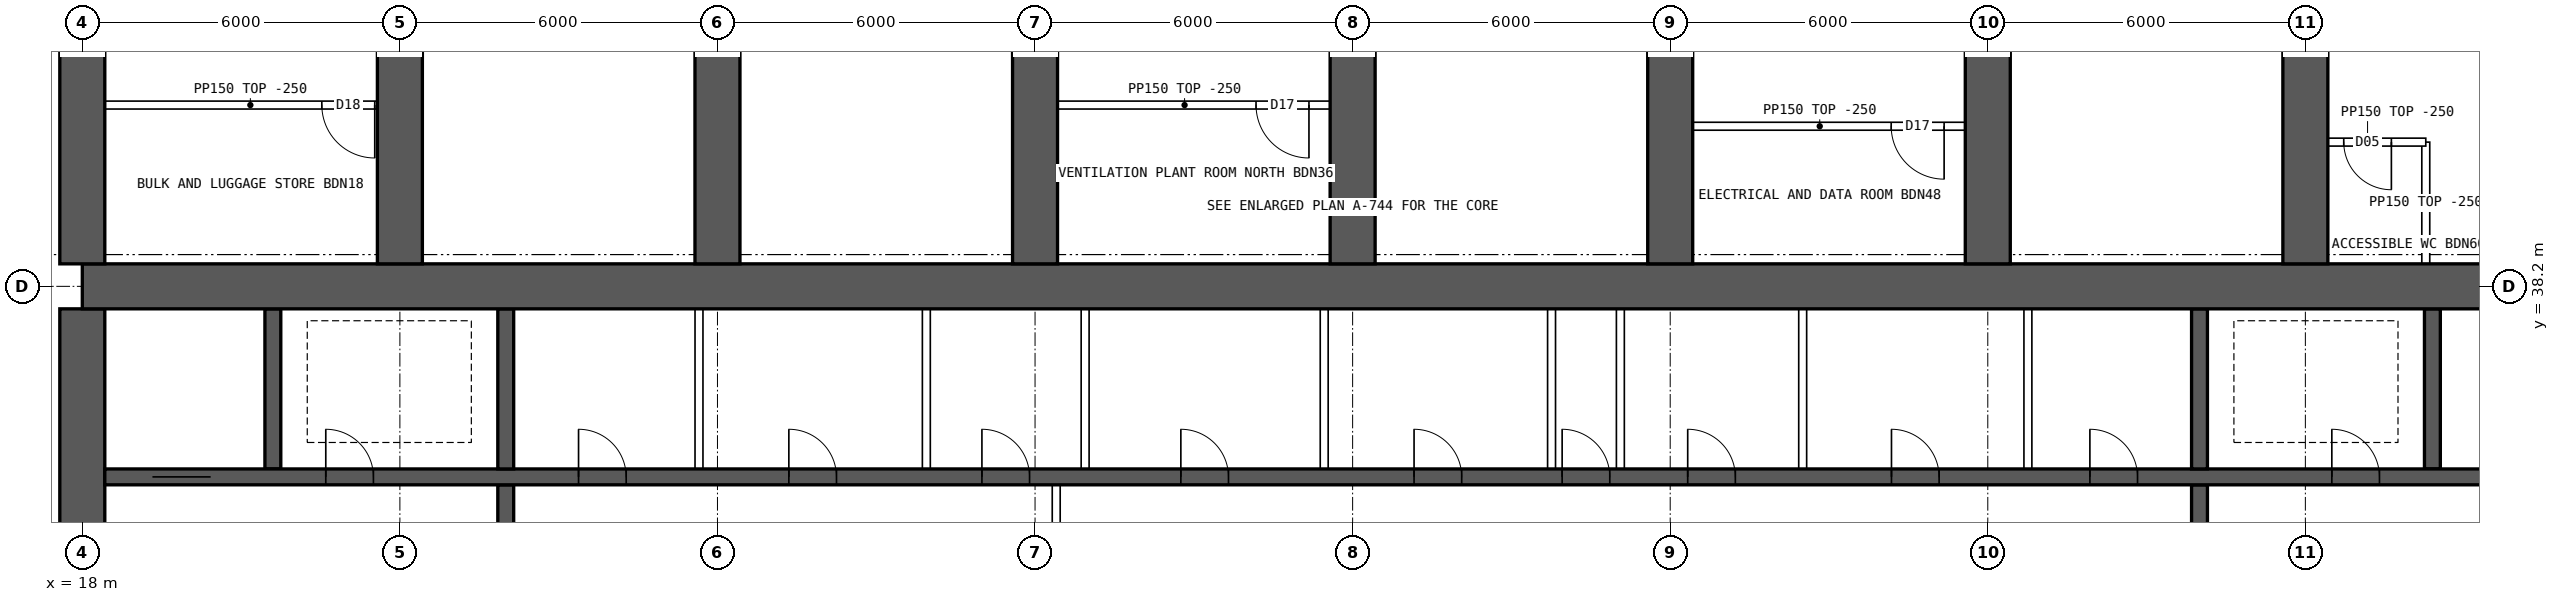
"""IFC4 building model, lengths in metres.
Left out: names, types, materials, properties, quantities, classifications, styles, units other than length and angle.
Written with IfcOpenShell. Run it as: python <this file> out.ifc"""

import sys

from ifc_helpers import new_model, si_unit, direction, frame, frame_2d, origin, place, context, subcontext, project, spatial, rectangle, extrude, element, fill, save


model = new_model("IFC4")
c1 = context("Model", 3, precision=1e-05, world=origin(), true_north=direction((0.0, 1.0)))
c2 = subcontext(c1, "Body", "Model", "MODEL_VIEW")
j1 = project(units=[si_unit("LENGTHUNIT", "METRE"), si_unit("PLANEANGLEUNIT", "RADIAN")], contexts=[c1])
p1 = place(None, origin())
s1 = spatial("IfcSite", under=j1, at=p1, CompositionType="ELEMENT")
p2 = place(p1, origin())
s2 = spatial("IfcBuilding", under=s1, at=p2, CompositionType="ELEMENT")
p3 = place(p2, frame((0.0, 0.0, 167.35)))
s3 = spatial("IfcBuildingStorey", under=s2, at=p3, CompositionType="ELEMENT", Elevation=167.35)
p4 = place(p3, frame((18.0, 38.2, 0.0), z_axis=(0.0, 0.0, 1.0), x_axis=(1.0, 0.0, 0.0)))
e1 = element("IfcWall", 1, at=p4, inside=s3, PredefinedType="SHEAR", context=c2, shape_type="SweptSolid", body=[
    extrude(rectangle(XDim=48.0, YDim=0.85, at=frame_2d((24.0, 0.0))), origin(), (0.0, 0.0, 1.0), 3.75),
])
p5 = place(p3, frame((18.0, 26.225, 0.0), z_axis=(0.0, 0.0, 1.0), x_axis=(0.0, 1.0, 0.0)))
e2 = element("IfcWall", 2, at=p5, inside=s3, PredefinedType="SHEAR", context=c2, shape_type="SweptSolid", body=[
    extrude(rectangle(XDim=11.55, YDim=0.85, at=frame_2d((5.775, 0.0))), origin(), (0.0, 0.0, 1.0), 3.75),
])
p6 = place(p5, frame((5.075, 0.0, 0.0)))
e3 = element("IfcOpeningElement", 3, at=p6, cuts=e2, PredefinedType="OPENING", context=c2, shape_type="SweptSolid", body=[
    extrude(rectangle(XDim=1.2, YDim=2.1, at=frame_2d((0.6, 1.05))), frame((0.0, 0.435, 0.0), z_axis=(0.0, -1.0, 0.0), x_axis=(1.0, 0.0, 0.0)), (0.0, 0.0, 1.0), 0.87),
])
p7 = place(p3, frame((18.425, 34.6, 0.0), z_axis=(0.0, 0.0, 1.0), x_axis=(1.0, 0.0, 0.0)))
e4 = element("IfcWall", 4, at=p7, inside=s3, PredefinedType="SHEAR", context=c2, shape_type="SweptSolid", body=[
    extrude(rectangle(XDim=47.15, YDim=0.3, at=frame_2d((23.575, 0.0))), origin(), (0.0, 0.0, 1.0), 3.75),
])
p8 = place(p7, frame((0.9, 0.0, 0.0)))
e5 = element("IfcOpeningElement", 5, at=p8, cuts=e4, PredefinedType="OPENING", context=c2, shape_type="SweptSolid", body=[
    extrude(rectangle(XDim=1.1, YDim=2.1, at=frame_2d((0.55, 1.05))), frame((0.0, 0.16, 0.0), z_axis=(0.0, -1.0, 0.0), x_axis=(1.0, 0.0, 0.0)), (0.0, 0.0, 1.0), 0.32),
])
p9 = place(p7, frame((45.15, 0.0, 0.0)))
e6 = element("IfcOpeningElement", 6, at=p9, cuts=e4, PredefinedType="OPENING", context=c2, shape_type="SweptSolid", body=[
    extrude(rectangle(XDim=1.1, YDim=2.1, at=frame_2d((0.55, 1.05))), frame((0.0, 0.16, 0.0), z_axis=(0.0, -1.0, 0.0), x_axis=(1.0, 0.0, 0.0)), (0.0, 0.0, 1.0), 0.32),
])
p10 = place(p7, frame((4.175, 0.0, 0.0)))
e7 = element("IfcOpeningElement", 7, at=p10, cuts=e4, PredefinedType="OPENING", context=c2, shape_type="SweptSolid", body=[
    extrude(rectangle(XDim=0.9, YDim=2.1, at=frame_2d((0.45, 1.05))), frame((0.0, 0.16, 0.0), z_axis=(0.0, -1.0, 0.0), x_axis=(1.0, 0.0, 0.0)), (0.0, 0.0, 1.0), 0.32),
])
p11 = place(p7, frame((42.075, 0.0, 0.0)))
e8 = element("IfcOpeningElement", 8, at=p11, cuts=e4, PredefinedType="OPENING", context=c2, shape_type="SweptSolid", body=[
    extrude(rectangle(XDim=0.9, YDim=2.1, at=frame_2d((0.45, 1.05))), frame((0.0, 0.16, 0.0), z_axis=(0.0, -1.0, 0.0), x_axis=(1.0, 0.0, 0.0)), (0.0, 0.0, 1.0), 0.32),
])
p12 = place(p7, frame((8.95, 0.0, 0.0)))
e9 = element("IfcOpeningElement", 9, at=p12, cuts=e4, PredefinedType="OPENING", context=c2, shape_type="SweptSolid", body=[
    extrude(rectangle(XDim=0.9, YDim=2.1, at=frame_2d((0.45, 1.05))), frame((0.0, 0.16, 0.0), z_axis=(0.0, -1.0, 0.0), x_axis=(1.0, 0.0, 0.0)), (0.0, 0.0, 1.0), 0.32),
])
p13 = place(p7, frame((12.924, 0.0, 0.0)))
e10 = element("IfcOpeningElement", 10, at=p13, cuts=e4, PredefinedType="OPENING", context=c2, shape_type="SweptSolid", body=[
    extrude(rectangle(XDim=0.9, YDim=2.1, at=frame_2d((0.45, 1.05))), frame((0.0, 0.16, 0.0), z_axis=(0.0, -1.0, 0.0), x_axis=(1.0, 0.0, 0.0)), (0.0, 0.0, 1.0), 0.32),
])
p14 = place(p7, frame((16.571, 0.0, 0.0)))
e11 = element("IfcOpeningElement", 11, at=p14, cuts=e4, PredefinedType="OPENING", context=c2, shape_type="SweptSolid", body=[
    extrude(rectangle(XDim=0.9, YDim=2.1, at=frame_2d((0.45, 1.05))), frame((0.0, 0.16, 0.0), z_axis=(0.0, -1.0, 0.0), x_axis=(1.0, 0.0, 0.0)), (0.0, 0.0, 1.0), 0.32),
])
p15 = place(p7, frame((20.33, 0.0, 0.0)))
e12 = element("IfcOpeningElement", 12, at=p15, cuts=e4, PredefinedType="OPENING", context=c2, shape_type="SweptSolid", body=[
    extrude(rectangle(XDim=0.9, YDim=2.1, at=frame_2d((0.45, 1.05))), frame((0.0, 0.16, 0.0), z_axis=(0.0, -1.0, 0.0), x_axis=(1.0, 0.0, 0.0)), (0.0, 0.0, 1.0), 0.32),
])
p16 = place(p7, frame((24.736, 0.0, 0.0)))
e13 = element("IfcOpeningElement", 13, at=p16, cuts=e4, PredefinedType="OPENING", context=c2, shape_type="SweptSolid", body=[
    extrude(rectangle(XDim=0.9, YDim=2.1, at=frame_2d((0.45, 1.05))), frame((0.0, 0.16, 0.0), z_axis=(0.0, -1.0, 0.0), x_axis=(1.0, 0.0, 0.0)), (0.0, 0.0, 1.0), 0.32),
])
p17 = place(p7, frame((27.533, 0.0, 0.0)))
e14 = element("IfcOpeningElement", 14, at=p17, cuts=e4, PredefinedType="OPENING", context=c2, shape_type="SweptSolid", body=[
    extrude(rectangle(XDim=0.9, YDim=2.1, at=frame_2d((0.45, 1.05))), frame((0.0, 0.16, 0.0), z_axis=(0.0, -1.0, 0.0), x_axis=(1.0, 0.0, 0.0)), (0.0, 0.0, 1.0), 0.32),
])
p18 = place(p7, frame((29.906, 0.0, 0.0)))
e15 = element("IfcOpeningElement", 15, at=p18, cuts=e4, PredefinedType="OPENING", context=c2, shape_type="SweptSolid", body=[
    extrude(rectangle(XDim=0.9, YDim=2.1, at=frame_2d((0.45, 1.05))), frame((0.0, 0.16, 0.0), z_axis=(0.0, -1.0, 0.0), x_axis=(1.0, 0.0, 0.0)), (0.0, 0.0, 1.0), 0.32),
])
p19 = place(p7, frame((33.756, 0.0, 0.0)))
e16 = element("IfcOpeningElement", 16, at=p19, cuts=e4, PredefinedType="OPENING", context=c2, shape_type="SweptSolid", body=[
    extrude(rectangle(XDim=0.9, YDim=2.1, at=frame_2d((0.45, 1.05))), frame((0.0, 0.16, 0.0), z_axis=(0.0, -1.0, 0.0), x_axis=(1.0, 0.0, 0.0)), (0.0, 0.0, 1.0), 0.32),
])
p20 = place(p7, frame((37.504, 0.0, 0.0)))
e17 = element("IfcOpeningElement", 17, at=p20, cuts=e4, PredefinedType="OPENING", context=c2, shape_type="SweptSolid", body=[
    extrude(rectangle(XDim=0.9, YDim=2.1, at=frame_2d((0.45, 1.05))), frame((0.0, 0.16, 0.0), z_axis=(0.0, -1.0, 0.0), x_axis=(1.0, 0.0, 0.0)), (0.0, 0.0, 1.0), 0.32),
])
p21 = place(p3, frame((26.0, 30.55, 0.0), z_axis=(0.0, 0.0, 1.0), x_axis=(0.0, 1.0, 0.0)))
e18 = element("IfcWall", 18, at=p21, inside=s3, PredefinedType="SHEAR", context=c2, shape_type="SweptSolid", body=[
    extrude(rectangle(XDim=3.9, YDim=0.3, at=frame_2d((1.95, 0.0))), origin(), (0.0, 0.0, 1.0), 3.75),
])
p22 = place(p21, frame((1.4, 0.0, 0.0)))
e19 = element("IfcOpeningElement", 19, at=p22, cuts=e18, PredefinedType="OPENING", context=c2, shape_type="SweptSolid", body=[
    extrude(rectangle(XDim=1.2, YDim=2.1, at=frame_2d((0.6, 1.05))), frame((0.0, 0.16, 0.0), z_axis=(0.0, -1.0, 0.0), x_axis=(1.0, 0.0, 0.0)), (0.0, 0.0, 1.0), 0.32),
])
p23 = place(p3, frame((58.0, 30.55, 0.0), z_axis=(0.0, 0.0, 1.0), x_axis=(0.0, 1.0, 0.0)))
e20 = element("IfcWall", 20, at=p23, inside=s3, PredefinedType="SHEAR", context=c2, shape_type="SweptSolid", body=[
    extrude(rectangle(XDim=3.9, YDim=0.3, at=frame_2d((1.95, 0.0))), origin(), (0.0, 0.0, 1.0), 3.75),
])
p24 = place(p23, frame((1.4, 0.0, 0.0)))
e21 = element("IfcOpeningElement", 21, at=p24, cuts=e20, PredefinedType="OPENING", context=c2, shape_type="SweptSolid", body=[
    extrude(rectangle(XDim=1.2, YDim=2.1, at=frame_2d((0.6, 1.05))), frame((0.0, 0.16, 0.0), z_axis=(0.0, -1.0, 0.0), x_axis=(1.0, 0.0, 0.0)), (0.0, 0.0, 1.0), 0.32),
])
for number, where, z_axis, x_axis in (
    (22, (21.6, 34.75, 0.0), (0.0, 0.0, 1.0), (0.0, 1.0, 0.0)),
    (23, (62.4, 34.75, 0.0), (0.0, 0.0, 1.0), (0.0, 1.0, 0.0)),
    (24, (26.0, 34.75, 0.0), (0.0, 0.0, 1.0), (0.0, 1.0, 0.0)),
    (25, (58.0, 34.75, 0.0), (0.0, 0.0, 1.0), (0.0, 1.0, 0.0)),
):
    element("IfcWall", number, at=place(p3, frame(where, z_axis=z_axis, x_axis=x_axis)), inside=s3, PredefinedType="SHEAR", context=c2, shape_type="SweptSolid", body=[
        extrude(rectangle(XDim=3.025, YDim=0.3, at=frame_2d((1.512, 0.0))), origin(), (0.0, 0.0, 1.0), 3.75),
    ])
for number, where, z_axis, x_axis in (
    (26, (18.0, 38.625, 0.0), (0.0, 0.0, 1.0), (0.0, 1.0, 0.0)),
    (27, (24.0, 38.625, 0.0), (0.0, 0.0, 1.0), (0.0, 1.0, 0.0)),
    (28, (30.0, 38.625, 0.0), (0.0, 0.0, 1.0), (0.0, 1.0, 0.0)),
    (29, (36.0, 38.625, 0.0), (0.0, 0.0, 1.0), (0.0, 1.0, 0.0)),
    (30, (42.0, 38.625, 0.0), (0.0, 0.0, 1.0), (0.0, 1.0, 0.0)),
    (31, (48.0, 38.625, 0.0), (0.0, 0.0, 1.0), (0.0, 1.0, 0.0)),
    (32, (54.0, 38.625, 0.0), (0.0, 0.0, 1.0), (0.0, 1.0, 0.0)),
    (33, (60.0, 38.625, 0.0), (0.0, 0.0, 1.0), (0.0, 1.0, 0.0)),
):
    element("IfcWall", number, at=place(p3, frame(where, z_axis=z_axis, x_axis=x_axis)), inside=s3, PredefinedType="SHEAR", context=c2, shape_type="SweptSolid", body=[
        extrude(rectangle(XDim=8.175, YDim=0.85, at=frame_2d((4.087, 0.0))), origin(), (0.0, 0.0, 1.0), 3.75),
    ])
p25 = place(p3, frame((36.4, 30.55, 0.0), z_axis=(0.0, 0.0, 1.0), x_axis=(0.0, 1.0, 0.0)))
e34 = element("IfcWall", 34, at=p25, inside=s3, PredefinedType="SOLIDWALL", context=c2, shape_type="SweptSolid", body=[
    extrude(rectangle(XDim=3.9, YDim=0.15, at=frame_2d((1.95, 0.0))), origin(), (0.0, 0.0, 1.0), 3.5),
])
p26 = place(p25, frame((1.15, 0.0, 0.0)))
e35 = element("IfcOpeningElement", 35, at=p26, cuts=e34, PredefinedType="OPENING", context=c2, shape_type="SweptSolid", body=[
    extrude(rectangle(XDim=1.6, YDim=2.1, at=frame_2d((0.8, 1.05))), frame((0.0, 0.085, 0.0), z_axis=(0.0, -1.0, 0.0), x_axis=(1.0, 0.0, 0.0)), (0.0, 0.0, 1.0), 0.17),
])
for number, where, z_axis, x_axis in (
    (36, (29.651, 34.75, 0.0), (0.0, 0.0, 1.0), (0.0, 1.0, 0.0)),
    (37, (33.946, 34.75, 0.0), (0.0, 0.0, 1.0), (0.0, 1.0, 0.0)),
    (38, (36.946, 34.75, 0.0), (0.0, 0.0, 1.0), (0.0, 1.0, 0.0)),
    (39, (41.463, 34.75, 0.0), (0.0, 0.0, 1.0), (0.0, 1.0, 0.0)),
    (40, (45.758, 34.75, 0.0), (0.0, 0.0, 1.0), (0.0, 1.0, 0.0)),
    (41, (47.058, 34.75, 0.0), (0.0, 0.0, 1.0), (0.0, 1.0, 0.0)),
    (42, (50.503, 34.75, 0.0), (0.0, 0.0, 1.0), (0.0, 1.0, 0.0)),
    (43, (54.758, 34.75, 0.0), (0.0, 0.0, 1.0), (0.0, 1.0, 0.0)),
):
    element("IfcWall", number, at=place(p3, frame(where, z_axis=z_axis, x_axis=x_axis)), inside=s3, PredefinedType="SOLIDWALL", context=c2, shape_type="SweptSolid", body=[
        extrude(rectangle(XDim=3.025, YDim=0.15, at=frame_2d((1.512, 0.0))), origin(), (0.0, 0.0, 1.0), 3.5),
    ])
p27 = place(p3, frame((23.925, 41.625, 0.0), z_axis=(0.0, 0.0, 1.0), x_axis=(-1.0, 0.0, 0.0)))
e44 = element("IfcWall", 44, at=p27, inside=s3, PredefinedType="PARTITIONING", context=c2, shape_type="SweptSolid", body=[
    extrude(rectangle(XDim=5.5, YDim=0.15, at=frame_2d((2.75, 0.0))), origin(), (0.0, 0.0, 1.0), 3.5),
])
p28 = place(p27, frame((0.4, 0.0, 0.0)))
e45 = element("IfcOpeningElement", 45, at=p28, cuts=e44, PredefinedType="OPENING", context=c2, shape_type="SweptSolid", body=[
    extrude(rectangle(XDim=1.0, YDim=2.1, at=frame_2d((0.5, 1.05))), frame((0.0, 0.085, 0.0), z_axis=(0.0, -1.0, 0.0), x_axis=(1.0, 0.0, 0.0)), (0.0, 0.0, 1.0), 0.17),
])
p29 = place(p3, frame((41.575, 41.625, 0.0), z_axis=(0.0, 0.0, 1.0), x_axis=(-1.0, 0.0, 0.0)))
e46 = element("IfcWall", 46, at=p29, inside=s3, PredefinedType="PARTITIONING", context=c2, shape_type="SweptSolid", body=[
    extrude(rectangle(XDim=5.5, YDim=0.15, at=frame_2d((2.75, 0.0))), origin(), (0.0, 0.0, 1.0), 3.5),
])
p30 = place(p29, frame((0.4, 0.0, 0.0)))
e47 = element("IfcOpeningElement", 47, at=p30, cuts=e46, PredefinedType="OPENING", context=c2, shape_type="SweptSolid", body=[
    extrude(rectangle(XDim=1.0, YDim=2.1, at=frame_2d((0.5, 1.05))), frame((0.0, 0.085, 0.0), z_axis=(0.0, -1.0, 0.0), x_axis=(1.0, 0.0, 0.0)), (0.0, 0.0, 1.0), 0.17),
])
p31 = place(p3, frame((53.575, 41.225, 0.0), z_axis=(0.0, 0.0, 1.0), x_axis=(-1.0, 0.0, 0.0)))
e48 = element("IfcWall", 48, at=p31, inside=s3, PredefinedType="PARTITIONING", context=c2, shape_type="SweptSolid", body=[
    extrude(rectangle(XDim=5.5, YDim=0.15, at=frame_2d((2.75, 0.0))), origin(), (0.0, 0.0, 1.0), 3.5),
])
p32 = place(p31, frame((0.4, 0.0, 0.0)))
e49 = element("IfcOpeningElement", 49, at=p32, cuts=e48, PredefinedType="OPENING", context=c2, shape_type="SweptSolid", body=[
    extrude(rectangle(XDim=1.0, YDim=2.1, at=frame_2d((0.5, 1.05))), frame((0.0, 0.085, 0.0), z_axis=(0.0, -1.0, 0.0), x_axis=(1.0, 0.0, 0.0)), (0.0, 0.0, 1.0), 0.17),
])
p33 = place(p3, frame((62.275, 40.925, 0.0), z_axis=(0.0, 0.0, 1.0), x_axis=(0.0, -1.0, 0.0)))
e50 = element("IfcWall", 50, at=p33, inside=s3, PredefinedType="PARTITIONING", context=c2, shape_type="SweptSolid", body=[
    extrude(rectangle(XDim=2.3, YDim=0.15, at=frame_2d((1.15, 0.0))), origin(), (0.0, 0.0, 1.0), 3.5),
])
p34 = place(p3, frame((62.275, 40.925, 0.0), z_axis=(0.0, 0.0, 1.0), x_axis=(-1.0, 0.0, 0.0)))
e51 = element("IfcWall", 51, at=p34, inside=s3, PredefinedType="PARTITIONING", context=c2, shape_type="SweptSolid", body=[
    extrude(rectangle(XDim=2.2, YDim=0.15, at=frame_2d((1.1, 0.0))), origin(), (0.0, 0.0, 1.0), 3.5),
])
p35 = place(p34, frame((0.65, 0.0, 0.0)))
e52 = element("IfcOpeningElement", 52, at=p35, cuts=e51, PredefinedType="OPENING", context=c2, shape_type="SweptSolid", body=[
    extrude(rectangle(XDim=0.9, YDim=2.1, at=frame_2d((0.45, 1.05))), frame((0.0, 0.085, 0.0), z_axis=(0.0, -1.0, 0.0), x_axis=(1.0, 0.0, 0.0)), (0.0, 0.0, 1.0), 0.17),
])
p36 = place(p8, origin())
e53 = element("IfcDoor", 53, at=p36, inside=s3, OperationType="DOUBLE_DOOR_SLIDING", PredefinedType="DOOR", context=c2, shape_type="SweptSolid", body=[
    extrude(rectangle(XDim=1.1, YDim=2.1, at=frame_2d((0.55, 1.05))), frame((0.0, 0.025, 0.0), z_axis=(0.0, -1.0, 0.0), x_axis=(1.0, 0.0, 0.0)), (0.0, 0.0, 1.0), 0.05),
])
fill(e5, e53)
p37 = place(p10, origin())
e54 = element("IfcDoor", 54, at=p37, inside=s3, OperationType="SINGLE_SWING_LEFT", PredefinedType="DOOR", context=c2, shape_type="SweptSolid", body=[
    extrude(rectangle(XDim=0.9, YDim=2.1, at=frame_2d((0.45, 1.05))), frame((0.0, 0.025, 0.0), z_axis=(0.0, -1.0, 0.0), x_axis=(1.0, 0.0, 0.0)), (0.0, 0.0, 1.0), 0.05),
])
fill(e7, e54)
p38 = place(p11, origin())
e55 = element("IfcDoor", 55, at=p38, inside=s3, OperationType="SINGLE_SWING_LEFT", PredefinedType="DOOR", context=c2, shape_type="SweptSolid", body=[
    extrude(rectangle(XDim=0.9, YDim=2.1, at=frame_2d((0.45, 1.05))), frame((0.0, 0.025, 0.0), z_axis=(0.0, -1.0, 0.0), x_axis=(1.0, 0.0, 0.0)), (0.0, 0.0, 1.0), 0.05),
])
fill(e8, e55)
p39 = place(p12, origin())
e56 = element("IfcDoor", 56, at=p39, inside=s3, OperationType="SINGLE_SWING_LEFT", PredefinedType="DOOR", context=c2, shape_type="SweptSolid", body=[
    extrude(rectangle(XDim=0.9, YDim=2.1, at=frame_2d((0.45, 1.05))), frame((0.0, 0.025, 0.0), z_axis=(0.0, -1.0, 0.0), x_axis=(1.0, 0.0, 0.0)), (0.0, 0.0, 1.0), 0.05),
])
fill(e9, e56)
p40 = place(p13, origin())
e57 = element("IfcDoor", 57, at=p40, inside=s3, OperationType="SINGLE_SWING_LEFT", PredefinedType="DOOR", context=c2, shape_type="SweptSolid", body=[
    extrude(rectangle(XDim=0.9, YDim=2.1, at=frame_2d((0.45, 1.05))), frame((0.0, 0.025, 0.0), z_axis=(0.0, -1.0, 0.0), x_axis=(1.0, 0.0, 0.0)), (0.0, 0.0, 1.0), 0.05),
])
fill(e10, e57)
p41 = place(p14, origin())
e58 = element("IfcDoor", 58, at=p41, inside=s3, OperationType="SINGLE_SWING_LEFT", PredefinedType="DOOR", context=c2, shape_type="SweptSolid", body=[
    extrude(rectangle(XDim=0.9, YDim=2.1, at=frame_2d((0.45, 1.05))), frame((0.0, 0.025, 0.0), z_axis=(0.0, -1.0, 0.0), x_axis=(1.0, 0.0, 0.0)), (0.0, 0.0, 1.0), 0.05),
])
fill(e11, e58)
p42 = place(p15, origin())
e59 = element("IfcDoor", 59, at=p42, inside=s3, OperationType="SINGLE_SWING_LEFT", PredefinedType="DOOR", context=c2, shape_type="SweptSolid", body=[
    extrude(rectangle(XDim=0.9, YDim=2.1, at=frame_2d((0.45, 1.05))), frame((0.0, 0.025, 0.0), z_axis=(0.0, -1.0, 0.0), x_axis=(1.0, 0.0, 0.0)), (0.0, 0.0, 1.0), 0.05),
])
fill(e12, e59)
p43 = place(p16, origin())
e60 = element("IfcDoor", 60, at=p43, inside=s3, OperationType="SINGLE_SWING_LEFT", PredefinedType="DOOR", context=c2, shape_type="SweptSolid", body=[
    extrude(rectangle(XDim=0.9, YDim=2.1, at=frame_2d((0.45, 1.05))), frame((0.0, 0.025, 0.0), z_axis=(0.0, -1.0, 0.0), x_axis=(1.0, 0.0, 0.0)), (0.0, 0.0, 1.0), 0.05),
])
fill(e13, e60)
p44 = place(p17, origin())
e61 = element("IfcDoor", 61, at=p44, inside=s3, OperationType="SINGLE_SWING_LEFT", PredefinedType="DOOR", context=c2, shape_type="SweptSolid", body=[
    extrude(rectangle(XDim=0.9, YDim=2.1, at=frame_2d((0.45, 1.05))), frame((0.0, 0.025, 0.0), z_axis=(0.0, -1.0, 0.0), x_axis=(1.0, 0.0, 0.0)), (0.0, 0.0, 1.0), 0.05),
])
fill(e14, e61)
p45 = place(p18, origin())
e62 = element("IfcDoor", 62, at=p45, inside=s3, OperationType="SINGLE_SWING_LEFT", PredefinedType="DOOR", context=c2, shape_type="SweptSolid", body=[
    extrude(rectangle(XDim=0.9, YDim=2.1, at=frame_2d((0.45, 1.05))), frame((0.0, 0.025, 0.0), z_axis=(0.0, -1.0, 0.0), x_axis=(1.0, 0.0, 0.0)), (0.0, 0.0, 1.0), 0.05),
])
fill(e15, e62)
p46 = place(p19, origin())
e63 = element("IfcDoor", 63, at=p46, inside=s3, OperationType="SINGLE_SWING_LEFT", PredefinedType="DOOR", context=c2, shape_type="SweptSolid", body=[
    extrude(rectangle(XDim=0.9, YDim=2.1, at=frame_2d((0.45, 1.05))), frame((0.0, 0.025, 0.0), z_axis=(0.0, -1.0, 0.0), x_axis=(1.0, 0.0, 0.0)), (0.0, 0.0, 1.0), 0.05),
])
fill(e16, e63)
p47 = place(p20, origin())
e64 = element("IfcDoor", 64, at=p47, inside=s3, OperationType="SINGLE_SWING_LEFT", PredefinedType="DOOR", context=c2, shape_type="SweptSolid", body=[
    extrude(rectangle(XDim=0.9, YDim=2.1, at=frame_2d((0.45, 1.05))), frame((0.0, 0.025, 0.0), z_axis=(0.0, -1.0, 0.0), x_axis=(1.0, 0.0, 0.0)), (0.0, 0.0, 1.0), 0.05),
])
fill(e17, e64)
p48 = place(p28, origin())
e65 = element("IfcDoor", 65, at=p48, inside=s3, OperationType="SINGLE_SWING_LEFT", PredefinedType="DOOR", context=c2, shape_type="SweptSolid", body=[
    extrude(rectangle(XDim=1.0, YDim=2.1, at=frame_2d((0.5, 1.05))), frame((0.0, 0.025, 0.0), z_axis=(0.0, -1.0, 0.0), x_axis=(1.0, 0.0, 0.0)), (0.0, 0.0, 1.0), 0.05),
])
fill(e45, e65)
p49 = place(p30, origin())
e66 = element("IfcDoor", 66, at=p49, inside=s3, OperationType="SINGLE_SWING_LEFT", PredefinedType="DOOR", context=c2, shape_type="SweptSolid", body=[
    extrude(rectangle(XDim=1.0, YDim=2.1, at=frame_2d((0.5, 1.05))), frame((0.0, 0.025, 0.0), z_axis=(0.0, -1.0, 0.0), x_axis=(1.0, 0.0, 0.0)), (0.0, 0.0, 1.0), 0.05),
])
fill(e47, e66)
p50 = place(p32, origin())
e67 = element("IfcDoor", 67, at=p50, inside=s3, OperationType="SINGLE_SWING_LEFT", PredefinedType="DOOR", context=c2, shape_type="SweptSolid", body=[
    extrude(rectangle(XDim=1.0, YDim=2.1, at=frame_2d((0.5, 1.05))), frame((0.0, 0.025, 0.0), z_axis=(0.0, -1.0, 0.0), x_axis=(1.0, 0.0, 0.0)), (0.0, 0.0, 1.0), 0.05),
])
fill(e49, e67)
p51 = place(p35, origin())
e68 = element("IfcDoor", 68, at=p51, inside=s3, OperationType="SINGLE_SWING_LEFT", PredefinedType="DOOR", context=c2, shape_type="SweptSolid", body=[
    extrude(rectangle(XDim=0.9, YDim=2.1, at=frame_2d((0.45, 1.05))), frame((0.0, 0.025, 0.0), z_axis=(0.0, -1.0, 0.0), x_axis=(1.0, 0.0, 0.0)), (0.0, 0.0, 1.0), 0.05),
])
fill(e52, e68)
save(model, sys.argv[1])
